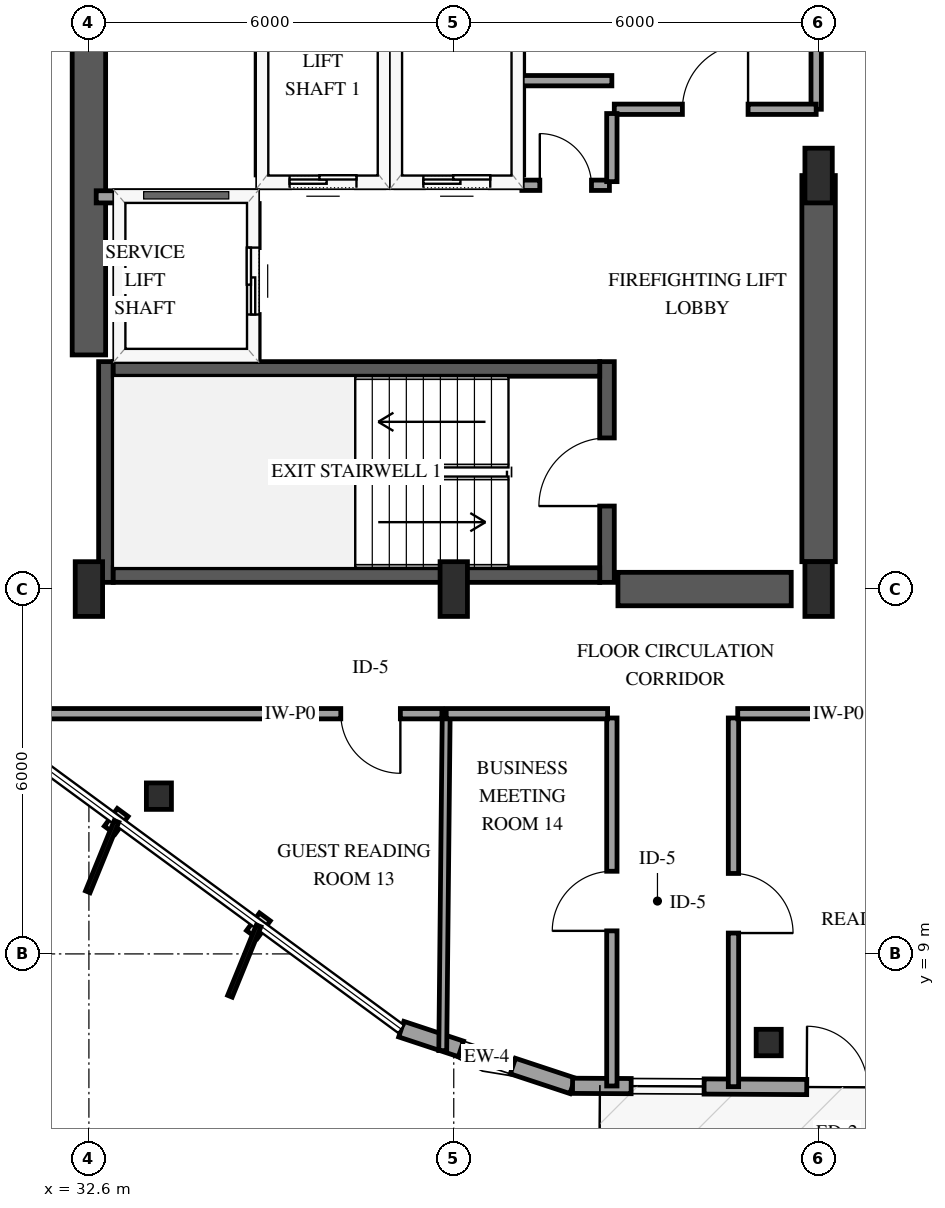
"""IFC4 building model, lengths in metres.
Left out: names, types, materials, properties, quantities, classifications, styles, units other than length and angle.
Written with IfcOpenShell. Run it as: python <this file> out.ifc"""

import sys

from ifc_helpers import new_model, si_unit, direction, frame, frame_2d, origin, origin_2d, place, context, subcontext, project, spatial, rectangle, i_section, extrude, element, fill, save


model = new_model("IFC4")
c1 = context("Model", 3, precision=1e-05, world=origin(), true_north=direction((0.0, 1.0)))
c2 = subcontext(c1, "Body", "Model", "MODEL_VIEW")
j1 = project(units=[si_unit("LENGTHUNIT", "METRE"), si_unit("PLANEANGLEUNIT", "RADIAN")], contexts=[c1])
p1 = place(None, origin())
s1 = spatial("IfcSite", under=j1, at=p1, CompositionType="ELEMENT")
p2 = place(p1, origin())
s2 = spatial("IfcBuilding", under=s1, at=p2, CompositionType="ELEMENT")
p3 = place(p2, frame((0.0, 0.0, 164.2)))
s3 = spatial("IfcBuildingStorey", under=s2, at=p3, CompositionType="ELEMENT", Elevation=164.2)
p4 = place(p3, frame((32.88, 15.11, 0.0), z_axis=(0.0, 0.0, 1.0), x_axis=(0.0, 1.0, 0.0)))
e1 = element("IfcWall", 1, at=p4, inside=s3, PredefinedType="SHEAR", context=c2, shape_type="SweptSolid", body=[
    extrude(rectangle(XDim=3.63, YDim=0.24, at=frame_2d((1.815, 0.0))), origin(), (0.0, 0.0, 1.0), 3.6),
])
p5 = place(p3, frame((41.12, 15.11, 0.0), z_axis=(0.0, 0.0, 1.0), x_axis=(0.0, 1.0, 0.0)))
e2 = element("IfcWall", 2, at=p5, inside=s3, PredefinedType="SHEAR", context=c2, shape_type="SweptSolid", body=[
    extrude(rectangle(XDim=3.63, YDim=0.24, at=frame_2d((1.815, 0.0))), origin(), (0.0, 0.0, 1.0), 3.6),
])
p6 = place(p5, frame((1.255, 0.0, 0.0)))
e3 = element("IfcOpeningElement", 3, at=p6, cuts=e2, PredefinedType="OPENING", context=c2, shape_type="SweptSolid", body=[
    extrude(rectangle(XDim=1.12, YDim=2.15, at=frame_2d((0.56, 1.075))), frame((0.0, 0.13, 0.0), z_axis=(0.0, -1.0, 0.0), x_axis=(1.0, 0.0, 0.0)), (0.0, 0.0, 1.0), 0.26),
])
for number, where, z_axis, x_axis in (
    (4, (33.0, 15.23, 0.0), (0.0, 0.0, 1.0), (1.0, 0.0, 0.0)),
    (5, (33.0, 18.62, 0.0), (0.0, 0.0, 1.0), (1.0, 0.0, 0.0)),
):
    element("IfcWall", number, at=place(p3, frame(where, z_axis=z_axis, x_axis=x_axis)), inside=s3, PredefinedType="SHEAR", context=c2, shape_type="SweptSolid", body=[
        extrude(rectangle(XDim=8.0, YDim=0.24, at=frame_2d((4.0, 0.0))), origin(), (0.0, 0.0, 1.0), 3.6),
    ])
p7 = place(p3, frame((32.6, 18.85, 0.0), z_axis=(0.0, 0.0, 1.0), x_axis=(0.0, 1.0, 0.0)))
e6 = element("IfcWall", 6, at=p7, inside=s3, PredefinedType="SHEAR", context=c2, shape_type="SweptSolid", body=[
    extrude(rectangle(XDim=12.3, YDim=0.55, at=frame_2d((6.15, 0.0))), origin(), (0.0, 0.0, 1.0), 3.6),
])
p8 = place(p3, frame((41.3, 15.0, 0.0), z_axis=(0.0, 0.0, 1.0), x_axis=(1.0, 0.0, 0.0)))
e7 = element("IfcWall", 7, at=p8, inside=s3, PredefinedType="SHEAR", context=c2, shape_type="SweptSolid", body=[
    extrude(rectangle(XDim=2.85, YDim=0.55, at=frame_2d((1.425, 0.0))), origin(), (0.0, 0.0, 1.0), 3.6),
])
p9 = place(p3, frame((44.6, 15.45, 0.0), z_axis=(0.0, 0.0, 1.0), x_axis=(0.0, 1.0, 0.0)))
e8 = element("IfcWall", 8, at=p9, inside=s3, PredefinedType="SHEAR", context=c2, shape_type="SweptSolid", body=[
    extrude(rectangle(XDim=6.35, YDim=0.55, at=frame_2d((3.175, 0.0))), origin(), (0.0, 0.0, 1.0), 3.6),
])
for number, where, z_axis, x_axis in (
    (9, (32.6, 15.0, 0.0), (0.0, 0.0, 1.0), (1.0, 0.0, 0.0)),
    (10, (38.6, 15.0, 0.0), (0.0, 0.0, 1.0), (1.0, 0.0, 0.0)),
    (11, (44.6, 15.0, 0.0), (0.0, 0.0, 1.0), (1.0, 0.0, 0.0)),
    (12, (44.6, 21.8, 0.0), (0.0, 0.0, 1.0), (1.0, 0.0, 0.0)),
):
    element("IfcColumn", number, at=place(p3, frame(where, z_axis=z_axis, x_axis=x_axis)), inside=s3, PredefinedType="PILASTER", context=c2, shape_type="SweptSolid", body=[
        extrude(rectangle(XDim=0.45, YDim=0.9, at=origin_2d()), origin(), (0.0, 0.0, 1.0), 3.6),
    ])
for number, where, z_axis, x_axis in (
    (13, (33.751, 11.594, 0.0), (0.0, 0.0, 1.0), (1.0, 0.0, 0.0)),
    (14, (43.779, 7.542, 0.0), (0.0, 0.0, 1.0), (1.0, 0.0, 0.0)),
):
    element("IfcColumn", number, at=place(p3, frame(where, z_axis=z_axis, x_axis=x_axis)), inside=s3, PredefinedType="COLUMN", context=c2, shape_type="SweptSolid", body=[
        extrude(i_section(OverallWidth=0.412, OverallDepth=0.435, WebThickness=0.036, FlangeThickness=0.057, FilletRadius=0.038, at=origin_2d()), origin(), (0.0, 0.0, 1.0), 3.6),
    ])
p10 = place(p3, frame((37.737, 7.762, 0.0), z_axis=(0.0, 0.0, 1.0), x_axis=(0.949413160374, -0.314029697494, 0.0)))
e15 = element("IfcWall", 15, at=p10, inside=s3, PredefinedType="SOLIDWALL", context=c2, shape_type="SweptSolid", body=[
    extrude(rectangle(XDim=2.967, YDim=0.27, at=frame_2d((1.483, 0.0))), origin(), (0.0, 0.0, 1.0), 2.679),
])
p11 = place(p10, frame((1.033, 0.0, 0.75)))
e16 = element("IfcOpeningElement", 16, at=p11, cuts=e15, PredefinedType="OPENING", context=c2, shape_type="SweptSolid", body=[
    extrude(rectangle(XDim=0.9, YDim=1.5, at=frame_2d((0.45, 0.75))), frame((0.0, 0.145, 0.0), z_axis=(0.0, -1.0, 0.0), x_axis=(1.0, 0.0, 0.0)), (0.0, 0.0, 1.0), 0.29),
])
p12 = place(p3, frame((40.553, 6.831, 0.0), z_axis=(0.0, 0.0, 1.0), x_axis=(0.999986386637, -0.005217905737, 0.0)))
e17 = element("IfcWall", 17, at=p12, inside=s3, PredefinedType="SOLIDWALL", context=c2, shape_type="SweptSolid", body=[
    extrude(rectangle(XDim=8.703, YDim=0.25, at=frame_2d((4.351, 0.0))), origin(), (0.0, 0.0, 1.0), 2.679),
])
p13 = place(p12, frame((3.851, 0.0, 0.0)))
e18 = element("IfcOpeningElement", 18, at=p13, cuts=e17, PredefinedType="OPENING", context=c2, shape_type="SweptSolid", body=[
    extrude(rectangle(XDim=1.0, YDim=2.15, at=frame_2d((0.5, 1.075))), frame((0.0, 0.135, 0.0), z_axis=(0.0, -1.0, 0.0), x_axis=(1.0, 0.0, 0.0)), (0.0, 0.0, 1.0), 0.27),
])
p14 = place(p12, frame((0.964, 0.0, 0.72)))
e19 = element("IfcOpeningElement", 19, at=p14, cuts=e17, PredefinedType="OPENING", context=c2, shape_type="SweptSolid", body=[
    extrude(rectangle(XDim=1.2, YDim=1.6, at=frame_2d((0.6, 0.8))), frame((0.0, 0.135, 0.0), z_axis=(0.0, -1.0, 0.0), x_axis=(1.0, 0.0, 0.0)), (0.0, 0.0, 1.0), 0.27),
])
p15 = place(p12, frame((5.491, 0.0, 0.72)))
e20 = element("IfcOpeningElement", 20, at=p15, cuts=e17, PredefinedType="OPENING", context=c2, shape_type="SweptSolid", body=[
    extrude(rectangle(XDim=1.2, YDim=1.6, at=frame_2d((0.6, 0.8))), frame((0.0, 0.135, 0.0), z_axis=(0.0, -1.0, 0.0), x_axis=(1.0, 0.0, 0.0)), (0.0, 0.0, 1.0), 0.27),
])
p16 = place(p3, frame((35.45, 21.7, 0.0), z_axis=(0.0, 0.0, 1.0), x_axis=(1.0, 0.0, 0.0)))
e21 = element("IfcWall", 21, at=p16, inside=s3, PredefinedType="SOLIDWALL", context=c2, shape_type="SweptSolid", body=[
    extrude(rectangle(XDim=2.0, YDim=0.2, at=frame_2d((1.0, 0.0))), origin(), (0.0, 0.0, 1.0), 3.3),
])
p17 = place(p16, frame((0.45, 0.0, 0.0)))
e22 = element("IfcOpeningElement", 22, at=p17, cuts=e21, PredefinedType="OPENING", context=c2, shape_type="SweptSolid", body=[
    extrude(rectangle(XDim=1.1, YDim=2.15, at=frame_2d((0.55, 1.075))), frame((0.0, 0.11, 0.0), z_axis=(0.0, -1.0, 0.0), x_axis=(1.0, 0.0, 0.0)), (0.0, 0.0, 1.0), 0.22),
])
for number, where, z_axis, x_axis in (
    (23, (35.45, 21.81, 0.0), (0.0, 0.0, 1.0), (0.0, 1.0, 0.0)),
    (24, (37.45, 21.81, 0.0), (0.0, 0.0, 1.0), (0.0, 1.0, 0.0)),
):
    element("IfcWall", number, at=place(p3, frame(where, z_axis=z_axis, x_axis=x_axis)), inside=s3, PredefinedType="SOLIDWALL", context=c2, shape_type="SweptSolid", body=[
        extrude(rectangle(XDim=2.38, YDim=0.2, at=frame_2d((1.19, 0.0))), origin(), (0.0, 0.0, 1.0), 3.3),
    ])
p18 = place(p3, frame((37.65, 21.7, 0.0), z_axis=(0.0, 0.0, 1.0), x_axis=(1.0, 0.0, 0.0)))
e25 = element("IfcWall", 25, at=p18, inside=s3, PredefinedType="SOLIDWALL", context=c2, shape_type="SweptSolid", body=[
    extrude(rectangle(XDim=2.0, YDim=0.2, at=frame_2d((1.0, 0.0))), origin(), (0.0, 0.0, 1.0), 3.3),
])
p19 = place(p18, frame((0.45, 0.0, 0.0)))
e26 = element("IfcOpeningElement", 26, at=p19, cuts=e25, PredefinedType="OPENING", context=c2, shape_type="SweptSolid", body=[
    extrude(rectangle(XDim=1.1, YDim=2.15, at=frame_2d((0.55, 1.075))), frame((0.0, 0.11, 0.0), z_axis=(0.0, -1.0, 0.0), x_axis=(1.0, 0.0, 0.0)), (0.0, 0.0, 1.0), 0.22),
])
p20 = place(p3, frame((39.65, 21.81, 0.0), z_axis=(0.0, 0.0, 1.0), x_axis=(0.0, 1.0, 0.0)))
e27 = element("IfcWall", 27, at=p20, inside=s3, PredefinedType="SOLIDWALL", context=c2, shape_type="SweptSolid", body=[
    extrude(rectangle(XDim=2.38, YDim=0.2, at=frame_2d((1.19, 0.0))), origin(), (0.0, 0.0, 1.0), 3.3),
])
p21 = place(p3, frame((32.72, 21.45, 0.0), z_axis=(0.0, 0.0, 1.0), x_axis=(1.0, 0.0, 0.0)))
e28 = element("IfcWall", 28, at=p21, inside=s3, PredefinedType="SOLIDWALL", context=c2, shape_type="SweptSolid", body=[
    extrude(rectangle(XDim=2.58, YDim=0.2, at=frame_2d((1.29, 0.0))), origin(), (0.0, 0.0, 1.0), 3.3),
])
p22 = place(p3, frame((35.3, 18.79, 0.0), z_axis=(0.0, 0.0, 1.0), x_axis=(0.0, 1.0, 0.0)))
e29 = element("IfcWall", 29, at=p22, inside=s3, PredefinedType="SOLIDWALL", context=c2, shape_type="SweptSolid", body=[
    extrude(rectangle(XDim=2.55, YDim=0.2, at=frame_2d((1.275, 0.0))), origin(), (0.0, 0.0, 1.0), 3.3),
])
p23 = place(p22, frame((0.725, 0.0, 0.0)))
e30 = element("IfcOpeningElement", 30, at=p23, cuts=e29, PredefinedType="OPENING", context=c2, shape_type="SweptSolid", body=[
    extrude(rectangle(XDim=1.1, YDim=2.15, at=frame_2d((0.55, 1.075))), frame((0.0, 0.11, 0.0), z_axis=(0.0, -1.0, 0.0), x_axis=(1.0, 0.0, 0.0)), (0.0, 0.0, 1.0), 0.22),
])
p24 = place(p3, frame((38.405, 12.95, 0.0), z_axis=(0.0, 0.0, 1.0), x_axis=(-1.0, 0.0, 0.0)))
e31 = element("IfcWall", 31, at=p24, inside=s3, PredefinedType="PARTITIONING", context=c2, shape_type="SweptSolid", body=[
    extrude(rectangle(XDim=7.717, YDim=0.17, at=frame_2d((3.858, 0.0))), origin(), (0.0, 0.0, 1.0), 3.3),
])
p25 = place(p24, frame((0.683, 0.0, 0.0)))
e32 = element("IfcOpeningElement", 32, at=p25, cuts=e31, PredefinedType="OPENING", context=c2, shape_type="SweptSolid", body=[
    extrude(rectangle(XDim=0.98, YDim=2.15, at=frame_2d((0.49, 1.075))), frame((0.0, 0.095, 0.0), z_axis=(0.0, -1.0, 0.0), x_axis=(1.0, 0.0, 0.0)), (0.0, 0.0, 1.0), 0.19),
])
p26 = place(p3, frame((44.56, 29.8, 0.0), z_axis=(0.0, 0.0, 1.0), x_axis=(0.0, -1.0, 0.0)))
e33 = element("IfcWall", 33, at=p26, inside=s3, PredefinedType="PARTITIONING", context=c2, shape_type="SweptSolid", body=[
    extrude(rectangle(XDim=6.91, YDim=0.17, at=frame_2d((3.455, 0.0))), origin(), (0.0, 0.0, 1.0), 2.34),
])
p27 = place(p26, frame((2.915, 0.0, 0.0)))
e34 = element("IfcOpeningElement", 34, at=p27, cuts=e33, PredefinedType="OPENING", context=c2, shape_type="SweptSolid", body=[
    extrude(rectangle(XDim=1.08, YDim=2.15, at=frame_2d((0.54, 1.075))), frame((0.0, 0.095, 0.0), z_axis=(0.0, -1.0, 0.0), x_axis=(1.0, 0.0, 0.0)), (0.0, 0.0, 1.0), 0.19),
])
p28 = place(p3, frame((43.2, 12.88, 0.0), z_axis=(0.0, 0.0, 1.0), x_axis=(0.0, -1.0, 0.0)))
e35 = element("IfcWall", 35, at=p28, inside=s3, PredefinedType="PARTITIONING", context=c2, shape_type="SweptSolid", body=[
    extrude(rectangle(XDim=6.063, YDim=0.17, at=frame_2d((3.031, 0.0))), origin(), (0.0, 0.0, 1.0), 2.595),
])
p29 = place(p28, frame((2.557, 0.0, 0.0)))
e36 = element("IfcOpeningElement", 36, at=p29, cuts=e35, PredefinedType="OPENING", context=c2, shape_type="SweptSolid", body=[
    extrude(rectangle(XDim=0.98, YDim=2.15, at=frame_2d((0.49, 1.075))), frame((0.0, 0.095, 0.0), z_axis=(0.0, -1.0, 0.0), x_axis=(1.0, 0.0, 0.0)), (0.0, 0.0, 1.0), 0.19),
])
p30 = place(p3, frame((41.2, 6.828, 0.0), z_axis=(0.0, 0.0, 1.0), x_axis=(0.0, 1.0, 0.0)))
e37 = element("IfcWall", 37, at=p30, inside=s3, PredefinedType="PARTITIONING", context=c2, shape_type="SweptSolid", body=[
    extrude(rectangle(XDim=6.052, YDim=0.17, at=frame_2d((3.026, 0.0))), origin(), (0.0, 0.0, 1.0), 3.3),
])
p31 = place(p30, frame((2.551, 0.0, 0.0)))
e38 = element("IfcOpeningElement", 38, at=p31, cuts=e37, PredefinedType="OPENING", context=c2, shape_type="SweptSolid", body=[
    extrude(rectangle(XDim=0.98, YDim=2.15, at=frame_2d((0.49, 1.075))), frame((0.0, 0.095, 0.0), z_axis=(0.0, -1.0, 0.0), x_axis=(1.0, 0.0, 0.0)), (0.0, 0.0, 1.0), 0.19),
])
p32 = place(p3, frame((38.475, 12.879, 0.0), z_axis=(0.0, 0.0, 1.0), x_axis=(-0.010266857628, -0.999947294428, 0.0)))
e39 = element("IfcWall", 39, at=p32, inside=s3, PredefinedType="PARTITIONING", context=c2, shape_type="SweptSolid", body=[
    extrude(rectangle(XDim=5.469, YDim=0.13, at=frame_2d((2.735, 0.0))), origin(), (0.0, 0.0, 1.0), 2.678),
])
p33 = place(p3, frame((41.24, 22.89, 0.0), z_axis=(0.0, 0.0, 1.0), x_axis=(1.0, 0.0, 0.0)))
e40 = element("IfcWall", 40, at=p33, inside=s3, PredefinedType="PARTITIONING", context=c2, shape_type="SweptSolid", body=[
    extrude(rectangle(XDim=3.32, YDim=0.17, at=frame_2d((1.66, 0.0))), origin(), (0.0, 0.0, 1.0), 3.3),
])
p34 = place(p33, frame((1.12, 0.0, 0.0)))
e41 = element("IfcOpeningElement", 41, at=p34, cuts=e40, PredefinedType="OPENING", context=c2, shape_type="SweptSolid", body=[
    extrude(rectangle(XDim=1.08, YDim=2.15, at=frame_2d((0.54, 1.075))), frame((0.0, 0.095, 0.0), z_axis=(0.0, -1.0, 0.0), x_axis=(1.0, 0.0, 0.0)), (0.0, 0.0, 1.0), 0.19),
])
p35 = place(p3, frame((41.13, 12.95, 0.0), z_axis=(0.0, 0.0, 1.0), x_axis=(-1.0, 0.0, 0.0)))
e42 = element("IfcWall", 42, at=p35, inside=s3, PredefinedType="PARTITIONING", context=c2, shape_type="SweptSolid", body=[
    extrude(rectangle(XDim=2.654, YDim=0.17, at=frame_2d((1.327, 0.0))), origin(), (0.0, 0.0, 1.0), 3.3),
])
p36 = place(p3, frame((45.738, 12.95, 0.0), z_axis=(0.0, 0.0, 1.0), x_axis=(-1.0, 0.0, 0.0)))
e43 = element("IfcWall", 43, at=p36, inside=s3, PredefinedType="PARTITIONING", context=c2, shape_type="SweptSolid", body=[
    extrude(rectangle(XDim=2.468, YDim=0.17, at=frame_2d((1.234, 0.0))), origin(), (0.0, 0.0, 1.0), 3.3),
])
p37 = place(p3, frame((39.72, 21.64, 0.0), z_axis=(0.0, 0.0, 1.0), x_axis=(1.0, 0.0, 0.0)))
e44 = element("IfcWall", 44, at=p37, inside=s3, PredefinedType="PARTITIONING", context=c2, shape_type="SweptSolid", body=[
    extrude(rectangle(XDim=1.44, YDim=0.17, at=frame_2d((0.72, 0.0))), origin(), (0.0, 0.0, 1.0), 3.3),
])
p38 = place(p37, frame((0.295, 0.0, 0.0)))
e45 = element("IfcOpeningElement", 45, at=p38, cuts=e44, PredefinedType="OPENING", context=c2, shape_type="SweptSolid", body=[
    extrude(rectangle(XDim=0.85, YDim=2.1, at=frame_2d((0.425, 1.05))), frame((0.0, 0.095, 0.0), z_axis=(0.0, -1.0, 0.0), x_axis=(1.0, 0.0, 0.0)), (0.0, 0.0, 1.0), 0.19),
])
p39 = place(p3, frame((41.2, 21.7, 0.0), z_axis=(0.0, 0.0, 1.0), x_axis=(0.0, 1.0, 0.0)))
e46 = element("IfcWall", 46, at=p39, inside=s3, PredefinedType="PARTITIONING", context=c2, shape_type="SweptSolid", body=[
    extrude(rectangle(XDim=1.12, YDim=0.17, at=frame_2d((0.56, 0.0))), origin(), (0.0, 0.0, 1.0), 3.3),
])
p40 = place(p3, frame((41.2, 23.36, 0.0), z_axis=(0.0, 0.0, 1.0), x_axis=(-1.0, 0.0, 0.0)))
e47 = element("IfcWall", 47, at=p40, inside=s3, PredefinedType="PARTITIONING", context=c2, shape_type="SweptSolid", body=[
    extrude(rectangle(XDim=1.48, YDim=0.17, at=frame_2d((0.74, 0.0))), origin(), (0.0, 0.0, 1.0), 3.3),
])
p41 = place(p11, origin())
e48 = element("IfcWindow", 48, at=p41, inside=s3, PartitioningType="SINGLE_PANEL", PredefinedType="WINDOW", context=c2, shape_type="SweptSolid", body=[
    extrude(rectangle(XDim=0.9, YDim=1.5, at=frame_2d((0.45, 0.75))), frame((0.0, 0.03, 0.0), z_axis=(0.0, -1.0, 0.0), x_axis=(1.0, 0.0, 0.0)), (0.0, 0.0, 1.0), 0.06),
])
fill(e16, e48)
p42 = place(p13, origin())
e49 = element("IfcDoor", 49, at=p42, inside=s3, OperationType="SINGLE_SWING_LEFT", PredefinedType="DOOR", context=c2, shape_type="SweptSolid", body=[
    extrude(rectangle(XDim=1.0, YDim=2.15, at=frame_2d((0.5, 1.075))), frame((0.0, 0.025, 0.0), z_axis=(0.0, -1.0, 0.0), x_axis=(1.0, 0.0, 0.0)), (0.0, 0.0, 1.0), 0.05),
])
fill(e18, e49)
p43 = place(p14, origin())
e50 = element("IfcWindow", 50, at=p43, inside=s3, PartitioningType="SINGLE_PANEL", PredefinedType="WINDOW", context=c2, shape_type="SweptSolid", body=[
    extrude(rectangle(XDim=1.2, YDim=1.6, at=frame_2d((0.6, 0.8))), frame((0.0, 0.03, 0.0), z_axis=(0.0, -1.0, 0.0), x_axis=(1.0, 0.0, 0.0)), (0.0, 0.0, 1.0), 0.06),
])
fill(e19, e50)
p44 = place(p17, origin())
e51 = element("IfcDoor", 51, at=p44, inside=s3, OperationType="SLIDING_TO_LEFT", PredefinedType="DOOR", context=c2, shape_type="SweptSolid", body=[
    extrude(rectangle(XDim=1.1, YDim=2.15, at=frame_2d((0.55, 1.075))), frame((0.0, 0.025, 0.0), z_axis=(0.0, -1.0, 0.0), x_axis=(1.0, 0.0, 0.0)), (0.0, 0.0, 1.0), 0.05),
])
fill(e22, e51)
p45 = place(p19, origin())
e52 = element("IfcDoor", 52, at=p45, inside=s3, OperationType="SLIDING_TO_LEFT", PredefinedType="DOOR", context=c2, shape_type="SweptSolid", body=[
    extrude(rectangle(XDim=1.1, YDim=2.15, at=frame_2d((0.55, 1.075))), frame((0.0, 0.025, 0.0), z_axis=(0.0, -1.0, 0.0), x_axis=(1.0, 0.0, 0.0)), (0.0, 0.0, 1.0), 0.05),
])
fill(e26, e52)
p46 = place(p23, origin())
e53 = element("IfcDoor", 53, at=p46, inside=s3, OperationType="SLIDING_TO_LEFT", PredefinedType="DOOR", context=c2, shape_type="SweptSolid", body=[
    extrude(rectangle(XDim=1.1, YDim=2.15, at=frame_2d((0.55, 1.075))), frame((0.0, 0.025, 0.0), z_axis=(0.0, -1.0, 0.0), x_axis=(1.0, 0.0, 0.0)), (0.0, 0.0, 1.0), 0.05),
])
fill(e30, e53)
p47 = place(p6, origin())
e54 = element("IfcDoor", 54, at=p47, inside=s3, OperationType="SINGLE_SWING_LEFT", PredefinedType="DOOR", context=c2, shape_type="SweptSolid", body=[
    extrude(rectangle(XDim=1.12, YDim=2.15, at=frame_2d((0.56, 1.075))), frame((0.0, 0.025, 0.0), z_axis=(0.0, -1.0, 0.0), x_axis=(1.0, 0.0, 0.0)), (0.0, 0.0, 1.0), 0.05),
])
fill(e3, e54)
p48 = place(p25, origin())
e55 = element("IfcDoor", 55, at=p48, inside=s3, OperationType="SINGLE_SWING_LEFT", PredefinedType="DOOR", context=c2, shape_type="SweptSolid", body=[
    extrude(rectangle(XDim=0.98, YDim=2.15, at=frame_2d((0.49, 1.075))), frame((0.0, 0.025, 0.0), z_axis=(0.0, -1.0, 0.0), x_axis=(1.0, 0.0, 0.0)), (0.0, 0.0, 1.0), 0.05),
])
fill(e32, e55)
p49 = place(p29, origin())
e56 = element("IfcDoor", 56, at=p49, inside=s3, OperationType="SINGLE_SWING_RIGHT", PredefinedType="DOOR", context=c2, shape_type="SweptSolid", body=[
    extrude(rectangle(XDim=0.98, YDim=2.15, at=frame_2d((0.49, 1.075))), frame((0.0, 0.025, 0.0), z_axis=(0.0, -1.0, 0.0), x_axis=(1.0, 0.0, 0.0)), (0.0, 0.0, 1.0), 0.05),
])
fill(e36, e56)
p50 = place(p31, origin())
e57 = element("IfcDoor", 57, at=p50, inside=s3, OperationType="SINGLE_SWING_LEFT", PredefinedType="DOOR", context=c2, shape_type="SweptSolid", body=[
    extrude(rectangle(XDim=0.98, YDim=2.15, at=frame_2d((0.49, 1.075))), frame((0.0, 0.025, 0.0), z_axis=(0.0, -1.0, 0.0), x_axis=(1.0, 0.0, 0.0)), (0.0, 0.0, 1.0), 0.05),
])
fill(e38, e57)
p51 = place(p34, origin())
e58 = element("IfcDoor", 58, at=p51, inside=s3, OperationType="SINGLE_SWING_RIGHT", PredefinedType="DOOR", context=c2, shape_type="SweptSolid", body=[
    extrude(rectangle(XDim=1.08, YDim=2.15, at=frame_2d((0.54, 1.075))), frame((0.0, 0.025, 0.0), z_axis=(0.0, -1.0, 0.0), x_axis=(1.0, 0.0, 0.0)), (0.0, 0.0, 1.0), 0.05),
])
fill(e41, e58)
p52 = place(p38, origin())
e59 = element("IfcDoor", 59, at=p52, inside=s3, OperationType="SINGLE_SWING_LEFT", PredefinedType="DOOR", context=c2, shape_type="SweptSolid", body=[
    extrude(rectangle(XDim=0.85, YDim=2.1, at=frame_2d((0.425, 1.05))), frame((0.0, 0.025, 0.0), z_axis=(0.0, -1.0, 0.0), x_axis=(1.0, 0.0, 0.0)), (0.0, 0.0, 1.0), 0.05),
])
fill(e45, e59)
save(model, sys.argv[1])
